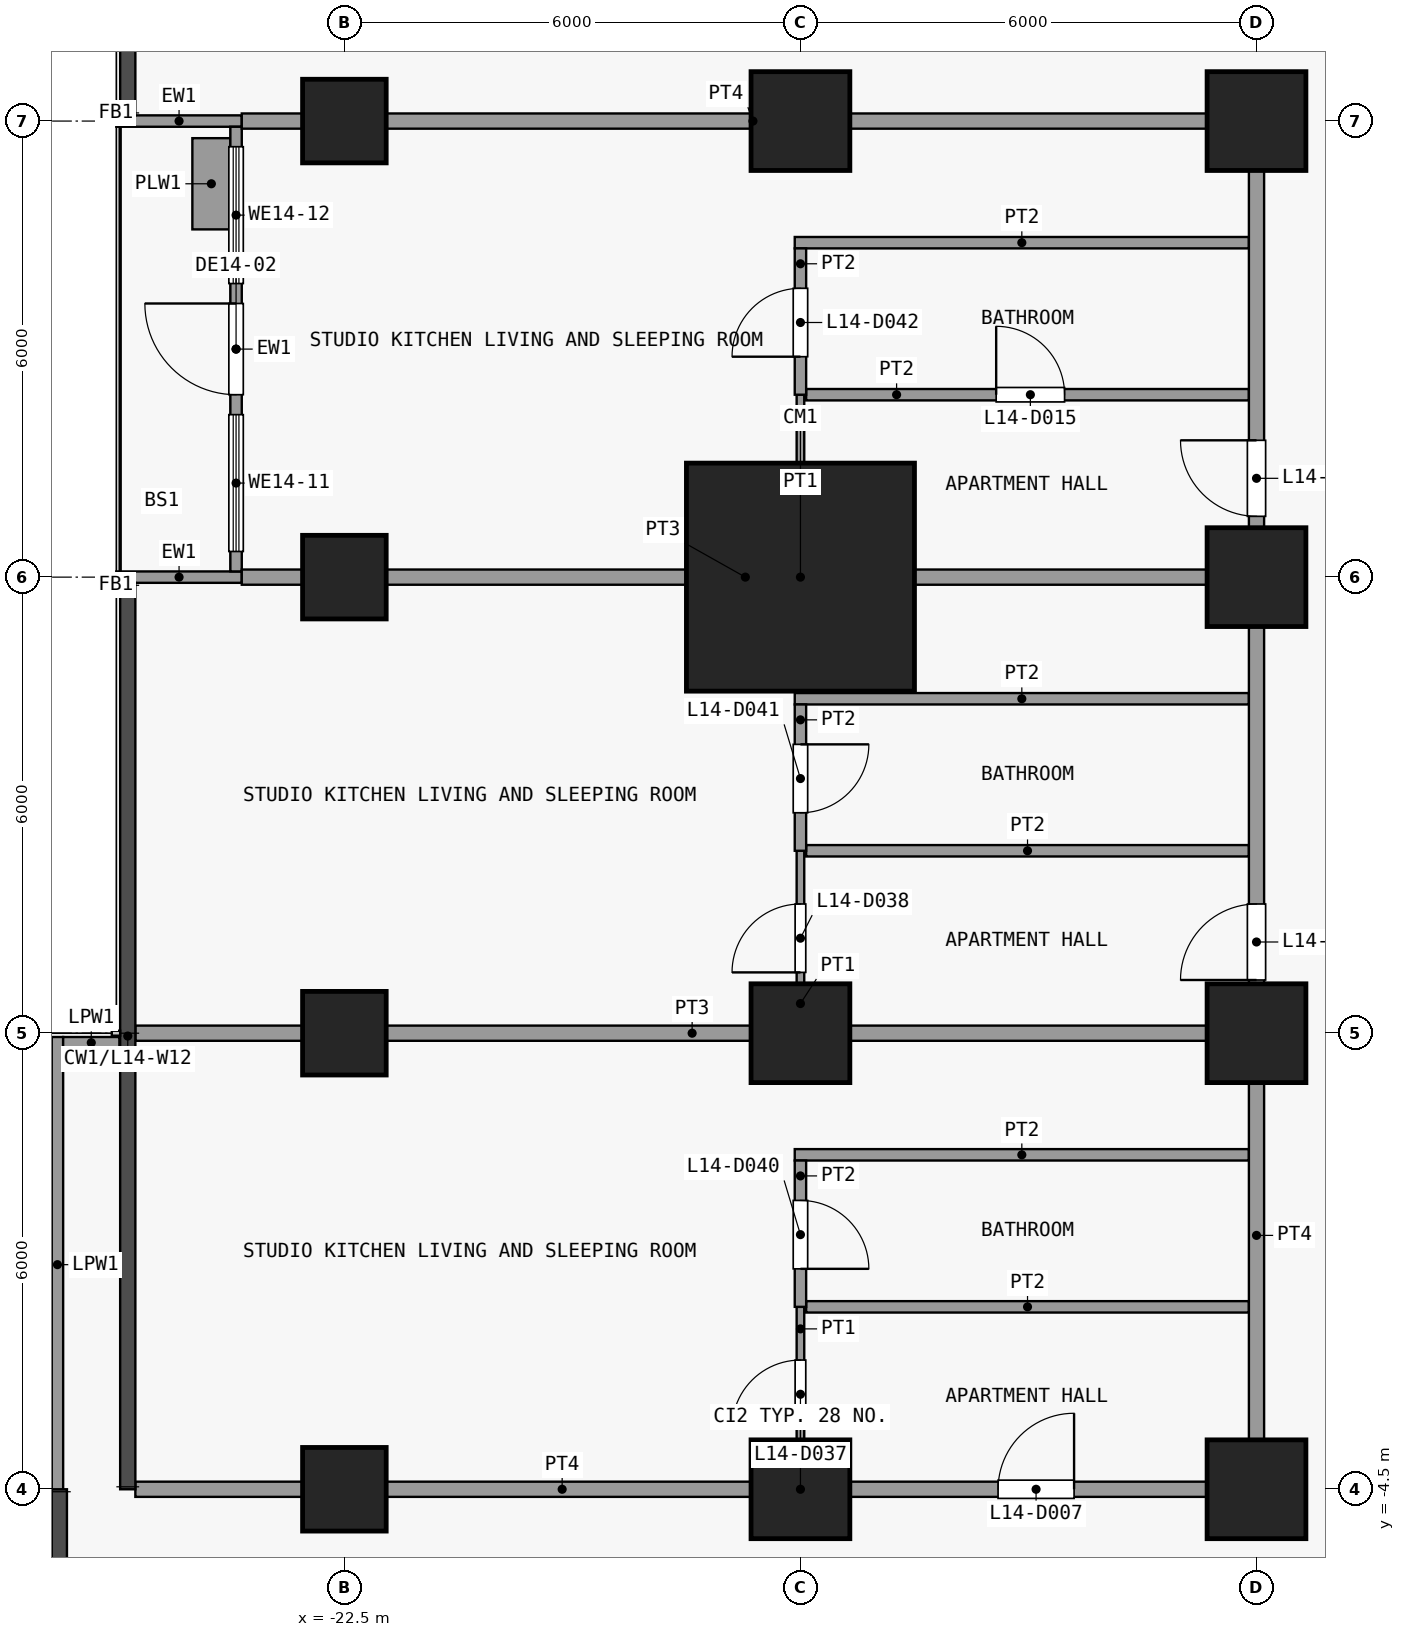
"""IFC4 building model, lengths in metres.
Left out: names, types, materials, properties, quantities, classifications, styles, units other than length and angle.
Written with IfcOpenShell. Run it as: python <this file> out.ifc"""

import sys

from ifc_helpers import new_model, si_unit, direction, frame, frame_2d, origin, origin_2d, place, context, subcontext, project, spatial, rectangle, extrude, element, fill, save


model = new_model("IFC4")
c1 = context("Model", 3, precision=1e-05, world=origin(), true_north=direction((0.0, 1.0)))
c2 = subcontext(c1, "Body", "Model", "MODEL_VIEW")
j1 = project(units=[si_unit("LENGTHUNIT", "METRE"), si_unit("PLANEANGLEUNIT", "RADIAN")], contexts=[c1])
p1 = place(None, origin())
s1 = spatial("IfcSite", under=j1, at=p1, CompositionType="ELEMENT")
p2 = place(p1, origin())
s2 = spatial("IfcBuilding", under=s1, at=p2, CompositionType="ELEMENT")
p3 = place(p2, frame((0.0, 0.0, 61.3)))
s3 = spatial("IfcBuildingStorey", under=s2, at=p3, CompositionType="ELEMENT", Elevation=61.3)
for number, where, z_axis, x_axis in (
    (1, (-22.5, -4.5, 0.0), (0.0, 0.0, 1.0), (1.0, 0.0, 0.0)),
    (2, (-22.5, 1.5, 0.0), (0.0, 0.0, 1.0), (1.0, 0.0, 0.0)),
    (3, (-22.5, 7.5, 0.0), (0.0, 0.0, 1.0), (1.0, 0.0, 0.0)),
    (4, (-22.5, 13.5, 0.0), (0.0, 0.0, 1.0), (1.0, 0.0, 0.0)),
):
    element("IfcColumn", number, at=place(p3, frame(where, z_axis=z_axis, x_axis=x_axis)), inside=s3, PredefinedType="COLUMN", context=c2, shape_type="SweptSolid", body=[
        extrude(rectangle(XDim=1.1, YDim=1.1, at=origin_2d()), origin(), (0.0, 0.0, 1.0), 3.6),
    ])
for number, where, z_axis, x_axis in (
    (5, (-16.5, -4.5, 0.0), (0.0, 0.0, 1.0), (1.0, 0.0, 0.0)),
    (6, (-16.5, 1.5, 0.0), (0.0, 0.0, 1.0), (1.0, 0.0, 0.0)),
):
    element("IfcColumn", number, at=place(p3, frame(where, z_axis=z_axis, x_axis=x_axis)), inside=s3, PredefinedType="COLUMN", context=c2, shape_type="SweptSolid", body=[
        extrude(rectangle(XDim=1.3, YDim=1.3, at=origin_2d()), origin(), (0.0, 0.0, 1.0), 3.6),
    ])
p4 = place(p3, frame((-16.5, 7.5, 0.0), z_axis=(0.0, 0.0, 1.0), x_axis=(1.0, 0.0, 0.0)))
e7 = element("IfcColumn", 7, at=p4, inside=s3, PredefinedType="COLUMN", context=c2, shape_type="SweptSolid", body=[
    extrude(rectangle(XDim=3.0, YDim=3.0, at=origin_2d()), origin(), (0.0, 0.0, 1.0), 3.6),
])
for number, where, z_axis, x_axis in (
    (8, (-16.5, 13.5, 0.0), (0.0, 0.0, 1.0), (1.0, 0.0, 0.0)),
    (9, (-10.5, -4.5, 0.0), (0.0, 0.0, 1.0), (1.0, 0.0, 0.0)),
    (10, (-10.5, 1.5, 0.0), (0.0, 0.0, 1.0), (1.0, 0.0, 0.0)),
    (11, (-10.5, 7.5, 0.0), (0.0, 0.0, 1.0), (1.0, 0.0, 0.0)),
    (12, (-10.5, 13.5, 0.0), (0.0, 0.0, 1.0), (1.0, 0.0, 0.0)),
):
    element("IfcColumn", number, at=place(p3, frame(where, z_axis=z_axis, x_axis=x_axis)), inside=s3, PredefinedType="COLUMN", context=c2, shape_type="SweptSolid", body=[
        extrude(rectangle(XDim=1.3, YDim=1.3, at=origin_2d()), origin(), (0.0, 0.0, 1.0), 3.6),
    ])
for number, where, z_axis, x_axis in (
    (13, (-23.85, 7.5, 0.0), (0.0, 0.0, 1.0), (-1.0, 0.0, 0.0)),
    (14, (-23.85, 13.5, 0.0), (0.0, 0.0, 1.0), (-1.0, 0.0, 0.0)),
):
    element("IfcWall", number, at=place(p3, frame(where, z_axis=z_axis, x_axis=x_axis)), inside=s3, PredefinedType="SOLIDWALL", context=c2, shape_type="SweptSolid", body=[
        extrude(rectangle(XDim=1.65, YDim=0.15, at=frame_2d((0.825, 0.0))), origin(), (0.0, 0.0, 1.0), 3.3),
    ])
p5 = place(p3, frame((-23.925, 7.575, 0.0), z_axis=(0.0, 0.0, 1.0), x_axis=(0.0, 1.0, 0.0)))
e15 = element("IfcWall", 15, at=p5, inside=s3, PredefinedType="SOLIDWALL", context=c2, shape_type="SweptSolid", body=[
    extrude(rectangle(XDim=5.85, YDim=0.15, at=frame_2d((2.925, 0.0))), origin(), (0.0, 0.0, 1.0), 3.3),
])
p6 = place(p5, frame((2.325, 0.0, 0.0)))
e16 = element("IfcOpeningElement", 16, at=p6, cuts=e15, PredefinedType="OPENING", context=c2, shape_type="SweptSolid", body=[
    extrude(rectangle(XDim=1.2, YDim=2.4, at=frame_2d((0.6, 1.2))), frame((0.0, 0.085, 0.0), z_axis=(0.0, -1.0, 0.0), x_axis=(1.0, 0.0, 0.0)), (0.0, 0.0, 1.0), 0.17),
])
p7 = place(p5, frame((0.262, 0.0, 0.9)))
e17 = element("IfcOpeningElement", 17, at=p7, cuts=e15, PredefinedType="OPENING", context=c2, shape_type="SweptSolid", body=[
    extrude(rectangle(XDim=1.8, YDim=2.1, at=frame_2d((0.9, 1.05))), frame((0.0, 0.085, 0.0), z_axis=(0.0, -1.0, 0.0), x_axis=(1.0, 0.0, 0.0)), (0.0, 0.0, 1.0), 0.17),
])
p8 = place(p5, frame((3.788, 0.0, 0.9)))
e18 = element("IfcOpeningElement", 18, at=p8, cuts=e15, PredefinedType="OPENING", context=c2, shape_type="SweptSolid", body=[
    extrude(rectangle(XDim=1.8, YDim=2.1, at=frame_2d((0.9, 1.05))), frame((0.0, 0.085, 0.0), z_axis=(0.0, -1.0, 0.0), x_axis=(1.0, 0.0, 0.0)), (0.0, 0.0, 1.0), 0.17),
])
p9 = place(p3, frame((-24.25, 12.075, 0.0), z_axis=(0.0, 0.0, 1.0), x_axis=(0.0, 1.0, 0.0)))
e19 = element("IfcWall", 19, at=p9, inside=s3, PredefinedType="USERDEFINED", context=c2, shape_type="SweptSolid", body=[
    extrude(rectangle(XDim=1.2, YDim=0.5, at=frame_2d((0.6, 0.0))), origin(), (0.0, 0.0, 1.0), 0.9),
])
p10 = place(p3, frame((-26.275, -4.54, 0.0), z_axis=(0.0, 0.0, 1.0), x_axis=(0.0, 1.0, 0.0)))
e20 = element("IfcWall", 20, at=p10, inside=s3, PredefinedType="PARAPET", context=c2, shape_type="SweptSolid", body=[
    extrude(rectangle(XDim=5.99, YDim=0.15, at=frame_2d((2.995, 0.0))), origin(), (0.0, 0.0, 1.0), 1.15),
])
p11 = place(p3, frame((-26.2, 1.375, 0.0), z_axis=(0.0, 0.0, 1.0), x_axis=(1.0, 0.0, 0.0)))
e21 = element("IfcWall", 21, at=p11, inside=s3, PredefinedType="PARAPET", context=c2, shape_type="SweptSolid", body=[
    extrude(rectangle(XDim=0.74, YDim=0.15, at=frame_2d((0.37, 0.0))), origin(), (0.0, 0.0, 1.0), 1.15),
])
p12 = place(p3, frame((-25.25, -4.5, 0.0), z_axis=(0.0, 0.0, 1.0), x_axis=(1.0, 0.0, 0.0)))
e22 = element("IfcWall", 22, at=p12, inside=s3, PredefinedType="PARTITIONING", context=c2, shape_type="SweptSolid", body=[
    extrude(rectangle(XDim=14.85, YDim=0.2, at=frame_2d((7.425, 0.0))), origin(), (0.0, 0.0, 1.0), 3.3),
])
p13 = place(p12, frame((11.35, 0.0, 0.0)))
e23 = element("IfcOpeningElement", 23, at=p13, cuts=e22, PredefinedType="OPENING", context=c2, shape_type="SweptSolid", body=[
    extrude(rectangle(XDim=1.0, YDim=2.1, at=frame_2d((0.5, 1.05))), frame((0.0, 0.11, 0.0), z_axis=(0.0, -1.0, 0.0), x_axis=(1.0, 0.0, 0.0)), (0.0, 0.0, 1.0), 0.22),
])
p14 = place(p3, frame((-16.425, -2.1, 0.0), z_axis=(0.0, 0.0, 1.0), x_axis=(1.0, 0.0, 0.0)))
e24 = element("IfcWall", 24, at=p14, inside=s3, PredefinedType="PARTITIONING", context=c2, shape_type="SweptSolid", body=[
    extrude(rectangle(XDim=5.825, YDim=0.15, at=frame_2d((2.913, 0.0))), origin(), (0.0, 0.0, 1.0), 3.3),
])
p15 = place(p3, frame((-16.575, -0.1, 0.0), z_axis=(0.0, 0.0, 1.0), x_axis=(1.0, 0.0, 0.0)))
e25 = element("IfcWall", 25, at=p15, inside=s3, PredefinedType="PARTITIONING", context=c2, shape_type="SweptSolid", body=[
    extrude(rectangle(XDim=5.975, YDim=0.15, at=frame_2d((2.987, 0.0))), origin(), (0.0, 0.0, 1.0), 3.3),
])
p16 = place(p3, frame((-25.25, 1.5, 0.0), z_axis=(0.0, 0.0, 1.0), x_axis=(1.0, 0.0, 0.0)))
e26 = element("IfcWall", 26, at=p16, inside=s3, PredefinedType="PARTITIONING", context=c2, shape_type="SweptSolid", body=[
    extrude(rectangle(XDim=14.65, YDim=0.2, at=frame_2d((7.325, 0.0))), origin(), (0.0, 0.0, 1.0), 3.3),
])
p17 = place(p3, frame((-16.425, 3.9, 0.0), z_axis=(0.0, 0.0, 1.0), x_axis=(1.0, 0.0, 0.0)))
e27 = element("IfcWall", 27, at=p17, inside=s3, PredefinedType="PARTITIONING", context=c2, shape_type="SweptSolid", body=[
    extrude(rectangle(XDim=5.825, YDim=0.15, at=frame_2d((2.913, 0.0))), origin(), (0.0, 0.0, 1.0), 3.3),
])
p18 = place(p3, frame((-16.575, 5.9, 0.0), z_axis=(0.0, 0.0, 1.0), x_axis=(1.0, 0.0, 0.0)))
e28 = element("IfcWall", 28, at=p18, inside=s3, PredefinedType="PARTITIONING", context=c2, shape_type="SweptSolid", body=[
    extrude(rectangle(XDim=5.975, YDim=0.15, at=frame_2d((2.987, 0.0))), origin(), (0.0, 0.0, 1.0), 3.3),
])
p19 = place(p3, frame((-23.85, 7.5, 0.0), z_axis=(0.0, 0.0, 1.0), x_axis=(1.0, 0.0, 0.0)))
e29 = element("IfcWall", 29, at=p19, inside=s3, PredefinedType="PARTITIONING", context=c2, shape_type="SweptSolid", body=[
    extrude(rectangle(XDim=13.25, YDim=0.2, at=frame_2d((6.625, 0.0))), origin(), (0.0, 0.0, 1.0), 3.3),
])
p20 = place(p3, frame((-16.425, 9.9, 0.0), z_axis=(0.0, 0.0, 1.0), x_axis=(1.0, 0.0, 0.0)))
e30 = element("IfcWall", 30, at=p20, inside=s3, PredefinedType="PARTITIONING", context=c2, shape_type="SweptSolid", body=[
    extrude(rectangle(XDim=5.825, YDim=0.15, at=frame_2d((2.913, 0.0))), origin(), (0.0, 0.0, 1.0), 3.3),
])
p21 = place(p20, frame((2.5, 0.0, 0.0)))
e31 = element("IfcOpeningElement", 31, at=p21, cuts=e30, PredefinedType="OPENING", context=c2, shape_type="SweptSolid", body=[
    extrude(rectangle(XDim=0.9, YDim=2.1, at=frame_2d((0.45, 1.05))), frame((0.0, 0.085, 0.0), z_axis=(0.0, -1.0, 0.0), x_axis=(1.0, 0.0, 0.0)), (0.0, 0.0, 1.0), 0.17),
])
p22 = place(p3, frame((-16.575, 11.9, 0.0), z_axis=(0.0, 0.0, 1.0), x_axis=(1.0, 0.0, 0.0)))
e32 = element("IfcWall", 32, at=p22, inside=s3, PredefinedType="PARTITIONING", context=c2, shape_type="SweptSolid", body=[
    extrude(rectangle(XDim=5.975, YDim=0.15, at=frame_2d((2.987, 0.0))), origin(), (0.0, 0.0, 1.0), 3.3),
])
p23 = place(p3, frame((-23.85, 13.5, 0.0), z_axis=(0.0, 0.0, 1.0), x_axis=(1.0, 0.0, 0.0)))
e33 = element("IfcWall", 33, at=p23, inside=s3, PredefinedType="PARTITIONING", context=c2, shape_type="SweptSolid", body=[
    extrude(rectangle(XDim=13.45, YDim=0.2, at=frame_2d((6.725, 0.0))), origin(), (0.0, 0.0, 1.0), 3.3),
])
p24 = place(p3, frame((-16.5, -4.4, 0.0), z_axis=(0.0, 0.0, 1.0), x_axis=(0.0, 1.0, 0.0)))
e34 = element("IfcWall", 34, at=p24, inside=s3, PredefinedType="PARTITIONING", context=c2, shape_type="SweptSolid", body=[
    extrude(rectangle(XDim=2.3, YDim=0.1, at=frame_2d((1.15, 0.0))), origin(), (0.0, 0.0, 1.0), 3.3),
])
p25 = place(p24, frame((0.7, 0.0, 0.0)))
e35 = element("IfcOpeningElement", 35, at=p25, cuts=e34, PredefinedType="OPENING", context=c2, shape_type="SweptSolid", body=[
    extrude(rectangle(XDim=0.9, YDim=2.1, at=frame_2d((0.45, 1.05))), frame((0.0, 0.06, 0.0), z_axis=(0.0, -1.0, 0.0), x_axis=(1.0, 0.0, 0.0)), (0.0, 0.0, 1.0), 0.12),
])
p26 = place(p3, frame((-16.5, 1.6, 0.0), z_axis=(0.0, 0.0, 1.0), x_axis=(0.0, 1.0, 0.0)))
e36 = element("IfcWall", 36, at=p26, inside=s3, PredefinedType="PARTITIONING", context=c2, shape_type="SweptSolid", body=[
    extrude(rectangle(XDim=2.3, YDim=0.1, at=frame_2d((1.15, 0.0))), origin(), (0.0, 0.0, 1.0), 3.3),
])
p27 = place(p26, frame((0.7, 0.0, 0.0)))
e37 = element("IfcOpeningElement", 37, at=p27, cuts=e36, PredefinedType="OPENING", context=c2, shape_type="SweptSolid", body=[
    extrude(rectangle(XDim=0.9, YDim=2.1, at=frame_2d((0.45, 1.05))), frame((0.0, 0.06, 0.0), z_axis=(0.0, -1.0, 0.0), x_axis=(1.0, 0.0, 0.0)), (0.0, 0.0, 1.0), 0.12),
])
p28 = place(p3, frame((-16.5, 7.6, 0.0), z_axis=(0.0, 0.0, 1.0), x_axis=(0.0, 1.0, 0.0)))
e38 = element("IfcWall", 38, at=p28, inside=s3, PredefinedType="PARTITIONING", context=c2, shape_type="SweptSolid", body=[
    extrude(rectangle(XDim=2.3, YDim=0.1, at=frame_2d((1.15, 0.0))), origin(), (0.0, 0.0, 1.0), 3.3),
])
p29 = place(p3, frame((-16.5, -2.1, 0.0), z_axis=(0.0, 0.0, 1.0), x_axis=(0.0, 1.0, 0.0)))
e39 = element("IfcWall", 39, at=p29, inside=s3, PredefinedType="PARTITIONING", context=c2, shape_type="SweptSolid", body=[
    extrude(rectangle(XDim=1.925, YDim=0.15, at=frame_2d((0.962, 0.0))), origin(), (0.0, 0.0, 1.0), 3.3),
])
p30 = place(p29, frame((0.5, 0.0, 0.0)))
e40 = element("IfcOpeningElement", 40, at=p30, cuts=e39, PredefinedType="OPENING", context=c2, shape_type="SweptSolid", body=[
    extrude(rectangle(XDim=0.9, YDim=2.1, at=frame_2d((0.45, 1.05))), frame((0.0, 0.085, 0.0), z_axis=(0.0, -1.0, 0.0), x_axis=(1.0, 0.0, 0.0)), (0.0, 0.0, 1.0), 0.17),
])
p31 = place(p3, frame((-16.5, 3.9, 0.0), z_axis=(0.0, 0.0, 1.0), x_axis=(0.0, 1.0, 0.0)))
e41 = element("IfcWall", 41, at=p31, inside=s3, PredefinedType="PARTITIONING", context=c2, shape_type="SweptSolid", body=[
    extrude(rectangle(XDim=1.925, YDim=0.15, at=frame_2d((0.962, 0.0))), origin(), (0.0, 0.0, 1.0), 3.3),
])
p32 = place(p31, frame((0.5, 0.0, 0.0)))
e42 = element("IfcOpeningElement", 42, at=p32, cuts=e41, PredefinedType="OPENING", context=c2, shape_type="SweptSolid", body=[
    extrude(rectangle(XDim=0.9, YDim=2.1, at=frame_2d((0.45, 1.05))), frame((0.0, 0.085, 0.0), z_axis=(0.0, -1.0, 0.0), x_axis=(1.0, 0.0, 0.0)), (0.0, 0.0, 1.0), 0.17),
])
p33 = place(p3, frame((-16.5, 9.9, 0.0), z_axis=(0.0, 0.0, 1.0), x_axis=(0.0, 1.0, 0.0)))
e43 = element("IfcWall", 43, at=p33, inside=s3, PredefinedType="PARTITIONING", context=c2, shape_type="SweptSolid", body=[
    extrude(rectangle(XDim=1.925, YDim=0.15, at=frame_2d((0.962, 0.0))), origin(), (0.0, 0.0, 1.0), 3.3),
])
p34 = place(p33, frame((0.5, 0.0, 0.0)))
e44 = element("IfcOpeningElement", 44, at=p34, cuts=e43, PredefinedType="OPENING", context=c2, shape_type="SweptSolid", body=[
    extrude(rectangle(XDim=0.9, YDim=2.1, at=frame_2d((0.45, 1.05))), frame((0.0, 0.085, 0.0), z_axis=(0.0, -1.0, 0.0), x_axis=(1.0, 0.0, 0.0)), (0.0, 0.0, 1.0), 0.17),
])
p35 = place(p3, frame((-10.5, -4.4, 0.0), z_axis=(0.0, 0.0, 1.0), x_axis=(0.0, 1.0, 0.0)))
e45 = element("IfcWall", 45, at=p35, inside=s3, PredefinedType="PARTITIONING", context=c2, shape_type="SweptSolid", body=[
    extrude(rectangle(XDim=17.8, YDim=0.2, at=frame_2d((8.9, 0.0))), origin(), (0.0, 0.0, 1.0), 3.3),
])
p36 = place(p35, frame((6.6, 0.0, 0.0)))
e46 = element("IfcOpeningElement", 46, at=p36, cuts=e45, PredefinedType="OPENING", context=c2, shape_type="SweptSolid", body=[
    extrude(rectangle(XDim=1.0, YDim=2.1, at=frame_2d((0.5, 1.05))), frame((0.0, 0.11, 0.0), z_axis=(0.0, -1.0, 0.0), x_axis=(1.0, 0.0, 0.0)), (0.0, 0.0, 1.0), 0.22),
])
p37 = place(p35, frame((12.7, 0.0, 0.0)))
e47 = element("IfcOpeningElement", 47, at=p37, cuts=e45, PredefinedType="OPENING", context=c2, shape_type="SweptSolid", body=[
    extrude(rectangle(XDim=1.0, YDim=2.1, at=frame_2d((0.5, 1.05))), frame((0.0, 0.11, 0.0), z_axis=(0.0, -1.0, 0.0), x_axis=(1.0, 0.0, 0.0)), (0.0, 0.0, 1.0), 0.22),
])
p38 = place(p6, origin())
e48 = element("IfcDoor", 48, at=p38, inside=s3, OperationType="SINGLE_SWING_RIGHT", PredefinedType="DOOR", context=c2, shape_type="SweptSolid", body=[
    extrude(rectangle(XDim=1.2, YDim=2.4, at=frame_2d((0.6, 1.2))), frame((0.0, 0.025, 0.0), z_axis=(0.0, -1.0, 0.0), x_axis=(1.0, 0.0, 0.0)), (0.0, 0.0, 1.0), 0.05),
])
fill(e16, e48)
p39 = place(p7, origin())
e49 = element("IfcWindow", 49, at=p39, inside=s3, PartitioningType="SINGLE_PANEL", PredefinedType="WINDOW", context=c2, shape_type="SweptSolid", body=[
    extrude(rectangle(XDim=1.8, YDim=2.1, at=frame_2d((0.9, 1.05))), frame((0.0, 0.03, 0.0), z_axis=(0.0, -1.0, 0.0), x_axis=(1.0, 0.0, 0.0)), (0.0, 0.0, 1.0), 0.06),
])
fill(e17, e49)
p40 = place(p8, origin())
e50 = element("IfcWindow", 50, at=p40, inside=s3, PartitioningType="SINGLE_PANEL", PredefinedType="WINDOW", context=c2, shape_type="SweptSolid", body=[
    extrude(rectangle(XDim=1.8, YDim=2.1, at=frame_2d((0.9, 1.05))), frame((0.0, 0.03, 0.0), z_axis=(0.0, -1.0, 0.0), x_axis=(1.0, 0.0, 0.0)), (0.0, 0.0, 1.0), 0.06),
])
fill(e18, e50)
p41 = place(p13, origin())
e51 = element("IfcDoor", 51, at=p41, inside=s3, OperationType="SINGLE_SWING_LEFT", PredefinedType="DOOR", context=c2, shape_type="SweptSolid", body=[
    extrude(rectangle(XDim=1.0, YDim=2.1, at=frame_2d((0.5, 1.05))), frame((0.0, 0.025, 0.0), z_axis=(0.0, -1.0, 0.0), x_axis=(1.0, 0.0, 0.0)), (0.0, 0.0, 1.0), 0.05),
])
fill(e23, e51)
p42 = place(p21, origin())
e52 = element("IfcDoor", 52, at=p42, inside=s3, OperationType="SINGLE_SWING_RIGHT", PredefinedType="DOOR", context=c2, shape_type="SweptSolid", body=[
    extrude(rectangle(XDim=0.9, YDim=2.1, at=frame_2d((0.45, 1.05))), frame((0.0, 0.025, 0.0), z_axis=(0.0, -1.0, 0.0), x_axis=(1.0, 0.0, 0.0)), (0.0, 0.0, 1.0), 0.05),
])
fill(e31, e52)
p43 = place(p25, origin())
e53 = element("IfcDoor", 53, at=p43, inside=s3, OperationType="SINGLE_SWING_RIGHT", PredefinedType="DOOR", context=c2, shape_type="SweptSolid", body=[
    extrude(rectangle(XDim=0.9, YDim=2.1, at=frame_2d((0.45, 1.05))), frame((0.0, 0.025, 0.0), z_axis=(0.0, -1.0, 0.0), x_axis=(1.0, 0.0, 0.0)), (0.0, 0.0, 1.0), 0.05),
])
fill(e35, e53)
p44 = place(p27, origin())
e54 = element("IfcDoor", 54, at=p44, inside=s3, OperationType="SINGLE_SWING_RIGHT", PredefinedType="DOOR", context=c2, shape_type="SweptSolid", body=[
    extrude(rectangle(XDim=0.9, YDim=2.1, at=frame_2d((0.45, 1.05))), frame((0.0, 0.025, 0.0), z_axis=(0.0, -1.0, 0.0), x_axis=(1.0, 0.0, 0.0)), (0.0, 0.0, 1.0), 0.05),
])
fill(e37, e54)
p45 = place(p30, origin())
e55 = element("IfcDoor", 55, at=p45, inside=s3, OperationType="SINGLE_SWING_LEFT", PredefinedType="DOOR", context=c2, shape_type="SweptSolid", body=[
    extrude(rectangle(XDim=0.9, YDim=2.1, at=frame_2d((0.45, 1.05))), frame((0.0, 0.025, 0.0), z_axis=(0.0, -1.0, 0.0), x_axis=(1.0, 0.0, 0.0)), (0.0, 0.0, 1.0), 0.05),
])
fill(e40, e55)
p46 = place(p32, origin())
e56 = element("IfcDoor", 56, at=p46, inside=s3, OperationType="SINGLE_SWING_RIGHT", PredefinedType="DOOR", context=c2, shape_type="SweptSolid", body=[
    extrude(rectangle(XDim=0.9, YDim=2.1, at=frame_2d((0.45, 1.05))), frame((0.0, 0.025, 0.0), z_axis=(0.0, -1.0, 0.0), x_axis=(1.0, 0.0, 0.0)), (0.0, 0.0, 1.0), 0.05),
])
fill(e42, e56)
p47 = place(p34, origin())
e57 = element("IfcDoor", 57, at=p47, inside=s3, OperationType="SINGLE_SWING_RIGHT", PredefinedType="DOOR", context=c2, shape_type="SweptSolid", body=[
    extrude(rectangle(XDim=0.9, YDim=2.1, at=frame_2d((0.45, 1.05))), frame((0.0, 0.025, 0.0), z_axis=(0.0, -1.0, 0.0), x_axis=(1.0, 0.0, 0.0)), (0.0, 0.0, 1.0), 0.05),
])
fill(e44, e57)
p48 = place(p36, origin())
e58 = element("IfcDoor", 58, at=p48, inside=s3, OperationType="SINGLE_SWING_RIGHT", PredefinedType="DOOR", context=c2, shape_type="SweptSolid", body=[
    extrude(rectangle(XDim=1.0, YDim=2.1, at=frame_2d((0.5, 1.05))), frame((0.0, 0.025, 0.0), z_axis=(0.0, -1.0, 0.0), x_axis=(1.0, 0.0, 0.0)), (0.0, 0.0, 1.0), 0.05),
])
fill(e46, e58)
p49 = place(p37, origin())
e59 = element("IfcDoor", 59, at=p49, inside=s3, OperationType="SINGLE_SWING_LEFT", PredefinedType="DOOR", context=c2, shape_type="SweptSolid", body=[
    extrude(rectangle(XDim=1.0, YDim=2.1, at=frame_2d((0.5, 1.05))), frame((0.0, 0.025, 0.0), z_axis=(0.0, -1.0, 0.0), x_axis=(1.0, 0.0, 0.0)), (0.0, 0.0, 1.0), 0.05),
])
fill(e47, e59)
save(model, sys.argv[1])
